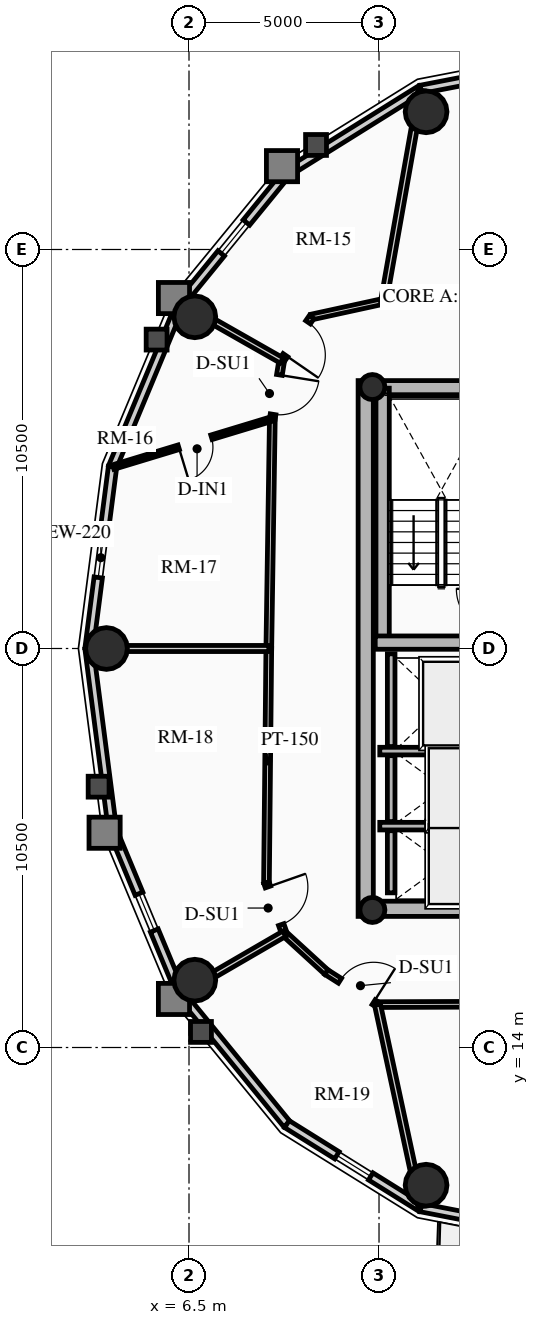
"""IFC4 building model, lengths in metres.
Left out: names, types, materials, properties, quantities, classifications, styles, units other than length and angle.
Written with IfcOpenShell. Run it as: python <this file> out.ifc"""

import sys

from ifc_helpers import new_model, si_unit, direction, frame, frame_2d, origin, origin_2d, place, context, subcontext, project, spatial, rectangle, circle, hollow_circle, extrude, source, transform, mapped, element, fill, save


model = new_model("IFC4")
c1 = context("Model", 3, precision=1e-05, world=origin(), true_north=direction((0.0, 1.0)))
c2 = subcontext(c1, "Body", "Model", "MODEL_VIEW")
j1 = project(units=[si_unit("LENGTHUNIT", "METRE"), si_unit("PLANEANGLEUNIT", "RADIAN")], contexts=[c1])
p1 = place(None, origin())
s1 = spatial("IfcSite", under=j1, at=p1, CompositionType="ELEMENT")
p2 = place(p1, origin())
s2 = spatial("IfcBuilding", under=s1, at=p2, CompositionType="ELEMENT")
p3 = place(p2, frame((0.0, 0.0, 208.3)))
s3 = spatial("IfcBuildingStorey", under=s2, at=p3, CompositionType="ELEMENT", Elevation=208.3)
p4 = place(p3, frame((11.15, 17.45, 0.0), z_axis=(0.0, 0.0, 1.0), x_axis=(0.0, 1.0, 0.0)))
e1 = element("IfcWall", 1, at=p4, inside=s3, PredefinedType="SHEAR", context=c2, shape_type="SweptSolid", body=[
    extrude(rectangle(XDim=14.1, YDim=0.4, at=frame_2d((7.05, 0.0))), origin(), (0.0, 0.0, 1.0), 2.91),
])
p5 = place(p3, frame((11.15, 17.65, 0.0), z_axis=(0.0, 0.0, 1.0), x_axis=(1.0, 0.0, 0.0)))
e2 = element("IfcWall", 2, at=p5, inside=s3, PredefinedType="SHEAR", context=c2, shape_type="SweptSolid", body=[
    extrude(rectangle(XDim=10.7, YDim=0.4, at=frame_2d((5.35, 0.0))), origin(), (0.0, 0.0, 1.0), 2.91),
])
m1 = source(origin(), c2, "Body", "SweptSolid", [
    extrude(rectangle(XDim=1.5, YDim=2.02, at=frame_2d((0.75, 1.01))), frame((0.0, 0.21, 0.0), z_axis=(0.0, -1.0, 0.0), x_axis=(1.0, 0.0, 0.0)), (0.0, 0.0, 1.0), 0.42),
])
p6 = place(p5, frame((5.45, 0.0, 0.0)))
e3 = element("IfcOpeningElement", 3, at=p6, cuts=e2, PredefinedType="OPENING", context=c2, shape_type="MappedRepresentation", body=[
    mapped(m1, transform((0.0, 0.0, 0.0), x_axis=(1.0, 0.0, 0.0), y_axis=(0.0, 1.0, 0.0), z_axis=(0.0, 0.0, 1.0), scale=1.0)),
])
p7 = place(p3, frame((11.15, 31.35, 0.0), z_axis=(0.0, 0.0, 1.0), x_axis=(1.0, 0.0, 0.0)))
e4 = element("IfcWall", 4, at=p7, inside=s3, PredefinedType="SHEAR", context=c2, shape_type="SweptSolid", body=[
    extrude(rectangle(XDim=10.7, YDim=0.4, at=frame_2d((5.35, 0.0))), origin(), (0.0, 0.0, 1.0), 2.91),
])
p8 = place(p7, frame((4.6, 0.0, 0.0)))
e5 = element("IfcOpeningElement", 5, at=p8, cuts=e4, PredefinedType="OPENING", context=c2, shape_type="MappedRepresentation", body=[
    mapped(m1, transform((0.0, 0.0, 0.0), x_axis=(1.0, 0.0, 0.0), y_axis=(0.0, 1.0, 0.0), z_axis=(0.0, 0.0, 1.0), scale=1.0)),
])
p9 = place(p3, frame((11.595, 24.655, 0.0), z_axis=(0.0, 0.0, 1.0), x_axis=(0.0, 1.0, 0.0)))
e6 = element("IfcWall", 6, at=p9, inside=s3, PredefinedType="SHEAR", context=c2, shape_type="SweptSolid", body=[
    extrude(rectangle(XDim=6.695, YDim=0.35, at=frame_2d((3.348, 0.0))), origin(), (0.0, 0.0, 1.0), 2.91),
])
p10 = place(p3, frame((11.4, 24.655, 0.0), z_axis=(0.0, 0.0, 1.0), x_axis=(1.0, 0.0, 0.0)))
e7 = element("IfcWall", 7, at=p10, inside=s3, PredefinedType="SHEAR", context=c2, shape_type="SweptSolid", body=[
    extrude(rectangle(XDim=3.285, YDim=0.35, at=frame_2d((1.643, 0.0))), origin(), (0.0, 0.0, 1.0), 2.91),
])
for number, where, z_axis, x_axis in (
    (8, (11.325, 17.62, 0.0), (0.0, 0.0, 1.0), (1.0, 0.0, 0.0)),
    (9, (11.325, 31.38, 0.0), (0.0, 0.0, 1.0), (1.0, 0.0, 0.0)),
):
    element("IfcColumn", number, at=place(p3, frame(where, z_axis=z_axis, x_axis=x_axis)), inside=s3, PredefinedType="COLUMN", context=c2, shape_type="SweptSolid", body=[
        extrude(hollow_circle(Radius=0.33, WallThickness=0.025, at=origin_2d()), origin(), (0.0, 0.0, 1.0), 2.91),
    ])
for number, where, z_axis, x_axis in (
    (10, (12.739, 38.623, 0.0), (0.0, 0.0, 1.0), (1.0, 0.0, 0.0)),
    (11, (6.653, 33.229, 0.0), (0.0, 0.0, 1.0), (1.0, 0.0, 0.0)),
    (12, (4.328, 24.5, 0.0), (0.0, 0.0, 1.0), (1.0, 0.0, 0.0)),
    (13, (6.653, 15.771, 0.0), (0.0, 0.0, 1.0), (1.0, 0.0, 0.0)),
    (14, (12.739, 10.377, 0.0), (0.0, 0.0, 1.0), (1.0, 0.0, 0.0)),
):
    element("IfcColumn", number, at=place(p3, frame(where, z_axis=z_axis, x_axis=x_axis)), inside=s3, PredefinedType="USERDEFINED", context=c2, shape_type="SweptSolid", body=[
        extrude(circle(Radius=0.55, at=origin_2d()), origin(), (0.0, 0.0, 1.0), 2.91),
    ])
p11 = place(p3, frame((12.597, 39.213, 0.0), z_axis=(0.0, 0.0, 1.0), x_axis=(0.981700307484, 0.190432419211, 0.0)))
e15 = element("IfcWall", 15, at=p11, inside=s3, PredefinedType="SOLIDWALL", context=c2, shape_type="SweptSolid", body=[
    extrude(rectangle(XDim=3.976, YDim=0.22, at=frame_2d((1.988, 0.0))), origin(), (0.0, 0.0, 1.0), 2.322),
])
m2 = source(origin(), c2, "Body", "SweptSolid", [
    extrude(rectangle(XDim=1.05, YDim=1.3, at=frame_2d((0.525, 0.65))), frame((0.0, 0.12, 0.0), z_axis=(0.0, -1.0, 0.0), x_axis=(1.0, 0.0, 0.0)), (0.0, 0.0, 1.0), 0.24),
])
p12 = place(p11, frame((1.463, 0.0, 0.65)))
e16 = element("IfcOpeningElement", 16, at=p12, cuts=e15, PredefinedType="OPENING", context=c2, shape_type="MappedRepresentation", body=[
    mapped(m2, transform((0.0, 0.0, 0.0), x_axis=(1.0, 0.0, 0.0), y_axis=(0.0, 1.0, 0.0), z_axis=(0.0, 0.0, 1.0), scale=1.0)),
])
p13 = place(p3, frame((9.076, 37.015, 0.0), z_axis=(0.0, 0.0, 1.0), x_axis=(0.848318713376, 0.529485939886, 0.0)))
e17 = element("IfcWall", 17, at=p13, inside=s3, PredefinedType="SOLIDWALL", context=c2, shape_type="SweptSolid", body=[
    extrude(rectangle(XDim=4.15, YDim=0.22, at=frame_2d((2.075, 0.0))), origin(), (0.0, 0.0, 1.0), 2.322),
])
p14 = place(p3, frame((6.282, 33.593, 0.0), z_axis=(0.0, 0.0, 1.0), x_axis=(0.632467166636, 0.774587169483, 0.0)))
e18 = element("IfcWall", 18, at=p14, inside=s3, PredefinedType="SOLIDWALL", context=c2, shape_type="SweptSolid", body=[
    extrude(rectangle(XDim=4.418, YDim=0.22, at=frame_2d((2.209, 0.0))), origin(), (0.0, 0.0, 1.0), 2.322),
])
p15 = place(p14, frame((1.684, 0.0, 0.65)))
e19 = element("IfcOpeningElement", 19, at=p15, cuts=e18, PredefinedType="OPENING", context=c2, shape_type="MappedRepresentation", body=[
    mapped(m2, transform((0.0, 0.0, 0.0), x_axis=(1.0, 0.0, 0.0), y_axis=(0.0, 1.0, 0.0), z_axis=(0.0, 0.0, 1.0), scale=1.0)),
])
p16 = place(p3, frame((4.488, 29.281, 0.0), z_axis=(0.0, 0.0, 1.0), x_axis=(0.384036305194, 0.923317993052, 0.0)))
e20 = element("IfcWall", 20, at=p16, inside=s3, PredefinedType="SOLIDWALL", context=c2, shape_type="SweptSolid", body=[
    extrude(rectangle(XDim=4.671, YDim=0.22, at=frame_2d((2.335, 0.0))), origin(), (0.0, 0.0, 1.0), 2.322),
])
p17 = place(p3, frame((3.87, 24.5, 0.0), z_axis=(0.0, 0.0, 1.0), x_axis=(0.128241318541, 0.991742993027, 0.0)))
e21 = element("IfcWall", 21, at=p17, inside=s3, PredefinedType="SOLIDWALL", context=c2, shape_type="SweptSolid", body=[
    extrude(rectangle(XDim=4.82, YDim=0.22, at=frame_2d((2.41, 0.0))), origin(), (0.0, 0.0, 1.0), 2.322),
])
p18 = place(p17, frame((1.885, 0.0, 0.65)))
e22 = element("IfcOpeningElement", 22, at=p18, cuts=e21, PredefinedType="OPENING", context=c2, shape_type="MappedRepresentation", body=[
    mapped(m2, transform((0.0, 0.0, 0.0), x_axis=(1.0, 0.0, 0.0), y_axis=(0.0, 1.0, 0.0), z_axis=(0.0, 0.0, 1.0), scale=1.0)),
])
p19 = place(p3, frame((4.488, 19.719, 0.0), z_axis=(0.0, 0.0, 1.0), x_axis=(-0.128241318541, 0.991742993027, 0.0)))
e23 = element("IfcWall", 23, at=p19, inside=s3, PredefinedType="SOLIDWALL", context=c2, shape_type="SweptSolid", body=[
    extrude(rectangle(XDim=4.82, YDim=0.22, at=frame_2d((2.41, 0.0))), origin(), (0.0, 0.0, 1.0), 2.322),
])
p20 = place(p3, frame((6.282, 15.407, 0.0), z_axis=(0.0, 0.0, 1.0), x_axis=(-0.384036305194, 0.923317993052, 0.0)))
e24 = element("IfcWall", 24, at=p20, inside=s3, PredefinedType="SOLIDWALL", context=c2, shape_type="SweptSolid", body=[
    extrude(rectangle(XDim=4.671, YDim=0.22, at=frame_2d((2.335, 0.0))), origin(), (0.0, 0.0, 1.0), 2.322),
])
p21 = place(p20, frame((1.81, 0.0, 0.65)))
e25 = element("IfcOpeningElement", 25, at=p21, cuts=e24, PredefinedType="OPENING", context=c2, shape_type="MappedRepresentation", body=[
    mapped(m2, transform((0.0, 0.0, 0.0), x_axis=(1.0, 0.0, 0.0), y_axis=(0.0, 1.0, 0.0), z_axis=(0.0, 0.0, 1.0), scale=1.0)),
])
p22 = place(p3, frame((9.076, 11.985, 0.0), z_axis=(0.0, 0.0, 1.0), x_axis=(-0.632467166636, 0.774587169483, 0.0)))
e26 = element("IfcWall", 26, at=p22, inside=s3, PredefinedType="SOLIDWALL", context=c2, shape_type="SweptSolid", body=[
    extrude(rectangle(XDim=4.418, YDim=0.22, at=frame_2d((2.209, 0.0))), origin(), (0.0, 0.0, 1.0), 2.322),
])
p23 = place(p3, frame((12.597, 9.787, 0.0), z_axis=(0.0, 0.0, 1.0), x_axis=(-0.848318713376, 0.529485939886, 0.0)))
e27 = element("IfcWall", 27, at=p23, inside=s3, PredefinedType="SOLIDWALL", context=c2, shape_type="SweptSolid", body=[
    extrude(rectangle(XDim=4.15, YDim=0.22, at=frame_2d((2.075, 0.0))), origin(), (0.0, 0.0, 1.0), 2.322),
])
p24 = place(p23, frame((1.55, 0.0, 0.65)))
e28 = element("IfcOpeningElement", 28, at=p24, cuts=e27, PredefinedType="OPENING", context=c2, shape_type="MappedRepresentation", body=[
    mapped(m2, transform((0.0, 0.0, 0.0), x_axis=(1.0, 0.0, 0.0), y_axis=(0.0, 1.0, 0.0), z_axis=(0.0, 0.0, 1.0), scale=1.0)),
])
p25 = place(p3, frame((16.5, 9.03, 0.0), z_axis=(0.0, 0.0, 1.0), x_axis=(-0.981700307484, 0.190432419211, 0.0)))
e29 = element("IfcWall", 29, at=p25, inside=s3, PredefinedType="SOLIDWALL", context=c2, shape_type="SweptSolid", body=[
    extrude(rectangle(XDim=3.976, YDim=0.22, at=frame_2d((1.988, 0.0))), origin(), (0.0, 0.0, 1.0), 2.322),
])
m3 = source(origin(), c2, "Body", "SweptSolid", [
    extrude(rectangle(XDim=1.15, YDim=2.005, at=frame_2d((0.575, 1.002))), frame((0.0, 0.12, 0.0), z_axis=(0.0, -1.0, 0.0), x_axis=(1.0, 0.0, 0.0)), (0.0, 0.0, 1.0), 0.24),
])
p26 = place(p25, frame((1.413, 0.0, 0.0)))
e30 = element("IfcOpeningElement", 30, at=p26, cuts=e29, PredefinedType="OPENING", context=c2, shape_type="MappedRepresentation", body=[
    mapped(m3, transform((0.0, 0.0, 0.0), x_axis=(1.0, 0.0, 0.0), y_axis=(0.0, 1.0, 0.0), z_axis=(0.0, 0.0, 1.0), scale=1.0)),
])
p27 = place(p3, frame((11.52, 21.8, 0.0), z_axis=(0.0, 0.0, 1.0), x_axis=(1.0, 0.0, 0.0)))
e31 = element("IfcWall", 31, at=p27, inside=s3, PredefinedType="SHEAR", context=c2, shape_type="SweptSolid", body=[
    extrude(rectangle(XDim=2.97, YDim=0.2, at=frame_2d((1.485, 0.0))), origin(), (0.0, 0.0, 1.0), 2.91),
])
p28 = place(p3, frame((11.82, 21.92, 0.0), z_axis=(0.0, 0.0, 1.0), x_axis=(0.0, 1.0, 0.0)))
e32 = element("IfcWall", 32, at=p28, inside=s3, PredefinedType="SHEAR", context=c2, shape_type="SweptSolid", body=[
    extrude(rectangle(XDim=2.44, YDim=0.2, at=frame_2d((1.22, 0.0))), origin(), (0.0, 0.0, 1.0), 2.91),
])
p29 = place(p3, frame((11.52, 19.825, 0.0), z_axis=(0.0, 0.0, 1.0), x_axis=(1.0, 0.0, 0.0)))
e33 = element("IfcWall", 33, at=p29, inside=s3, PredefinedType="SHEAR", context=c2, shape_type="SweptSolid", body=[
    extrude(rectangle(XDim=2.97, YDim=0.2, at=frame_2d((1.485, 0.0))), origin(), (0.0, 0.0, 1.0), 2.91),
])
p30 = place(p3, frame((11.82, 19.945, 0.0), z_axis=(0.0, 0.0, 1.0), x_axis=(0.0, 1.0, 0.0)))
e34 = element("IfcWall", 34, at=p30, inside=s3, PredefinedType="SHEAR", context=c2, shape_type="SweptSolid", body=[
    extrude(rectangle(XDim=1.735, YDim=0.2, at=frame_2d((0.867, 0.0))), origin(), (0.0, 0.0, 1.0), 2.91),
])
p31 = place(p3, frame((11.82, 18.07, 0.0), z_axis=(0.0, 0.0, 1.0), x_axis=(0.0, 1.0, 0.0)))
e35 = element("IfcWall", 35, at=p31, inside=s3, PredefinedType="SHEAR", context=c2, shape_type="SweptSolid", body=[
    extrude(rectangle(XDim=1.635, YDim=0.2, at=frame_2d((0.817, 0.0))), origin(), (0.0, 0.0, 1.0), 2.91),
])
p32 = place(p3, frame((18.143, 33.86, 0.0), z_axis=(0.0, 0.0, 1.0), x_axis=(-0.999419208319, -0.034077060363, 0.0)))
e36 = element("IfcWall", 36, at=p32, inside=s3, PredefinedType="PARTITIONING", context=c2, shape_type="SweptSolid", body=[
    extrude(rectangle(XDim=6.527, YDim=0.15, at=frame_2d((3.263, 0.0))), origin(), (0.0, 0.0, 1.0), 2.255),
])
p33 = place(p3, frame((11.62, 33.637, 0.0), z_axis=(0.0, 0.0, 1.0), x_axis=(-0.97702579435, -0.213121085711, 0.0)))
e37 = element("IfcWall", 37, at=p33, inside=s3, PredefinedType="PARTITIONING", context=c2, shape_type="SweptSolid", body=[
    extrude(rectangle(XDim=1.935, YDim=0.15, at=frame_2d((0.967, 0.0))), origin(), (0.0, 0.0, 1.0), 2.255),
])
p34 = place(p3, frame((9.729, 33.225, 0.0), z_axis=(0.0, 0.0, 1.0), x_axis=(-0.567183649484, -0.82359134755, 0.0)))
e38 = element("IfcWall", 38, at=p34, inside=s3, PredefinedType="PARTITIONING", context=c2, shape_type="SweptSolid", body=[
    extrude(rectangle(XDim=1.392, YDim=0.15, at=frame_2d((0.696, 0.0))), origin(), (0.0, 0.0, 1.0), 2.322),
])
m4 = source(origin(), c2, "Body", "SweptSolid", [
    extrude(rectangle(XDim=1.05, YDim=2.015, at=frame_2d((0.525, 1.007))), frame((0.0, 0.085, 0.0), z_axis=(0.0, -1.0, 0.0), x_axis=(1.0, 0.0, 0.0)), (0.0, 0.0, 1.0), 0.17),
])
p35 = place(p34, frame((0.171, 0.0, 0.0)))
e39 = element("IfcOpeningElement", 39, at=p35, cuts=e38, PredefinedType="OPENING", context=c2, shape_type="MappedRepresentation", body=[
    mapped(m4, transform((0.0, 0.0, 0.0), x_axis=(1.0, 0.0, 0.0), y_axis=(0.0, 1.0, 0.0), z_axis=(0.0, 0.0, 1.0), scale=1.0)),
])
p36 = place(p3, frame((8.94, 32.078, 0.0), z_axis=(0.0, 0.0, 1.0), x_axis=(-0.159148467753, -0.98725466077, 0.0)))
e40 = element("IfcWall", 40, at=p36, inside=s3, PredefinedType="PARTITIONING", context=c2, shape_type="SweptSolid", body=[
    extrude(rectangle(XDim=1.554, YDim=0.15, at=frame_2d((0.777, 0.0))), origin(), (0.0, 0.0, 1.0), 2.255),
])
p37 = place(p36, frame((0.384, 0.0, 0.0)))
e41 = element("IfcOpeningElement", 41, at=p37, cuts=e40, PredefinedType="OPENING", context=c2, shape_type="MappedRepresentation", body=[
    mapped(m4, transform((0.0, 0.0, 0.0), x_axis=(1.0, 0.0, 0.0), y_axis=(0.0, 1.0, 0.0), z_axis=(0.0, 0.0, 1.0), scale=1.0)),
])
p38 = place(p3, frame((8.693, 30.544, 0.0), z_axis=(0.0, 0.0, 1.0), x_axis=(-0.015307007986, -0.99988284089, 0.0)))
e42 = element("IfcWall", 42, at=p38, inside=s3, PredefinedType="PARTITIONING", context=c2, shape_type="SweptSolid", body=[
    extrude(rectangle(XDim=6.045, YDim=0.15, at=frame_2d((3.022, 0.0))), origin(), (0.0, 0.0, 1.0), 2.255),
])
p39 = place(p3, frame((8.6, 24.5, 0.0), z_axis=(0.0, 0.0, 1.0), x_axis=(-0.010023665349, -0.999949761805, 0.0)))
e43 = element("IfcWall", 43, at=p39, inside=s3, PredefinedType="PARTITIONING", context=c2, shape_type="SweptSolid", body=[
    extrude(rectangle(XDim=6.162, YDim=0.15, at=frame_2d((3.081, 0.0))), origin(), (0.0, 0.0, 1.0), 2.255),
])
p40 = place(p3, frame((8.538, 18.338, 0.0), z_axis=(0.0, 0.0, 1.0), x_axis=(0.331358150167, -0.94350504838, 0.0)))
e44 = element("IfcWall", 44, at=p40, inside=s3, PredefinedType="PARTITIONING", context=c2, shape_type="SweptSolid", body=[
    extrude(rectangle(XDim=1.424, YDim=0.15, at=frame_2d((0.712, 0.0))), origin(), (0.0, 0.0, 1.0), 2.255),
])
p41 = place(p40, frame((0.12, 0.0, 0.0)))
e45 = element("IfcOpeningElement", 45, at=p41, cuts=e44, PredefinedType="OPENING", context=c2, shape_type="MappedRepresentation", body=[
    mapped(m4, transform((0.0, 0.0, 0.0), x_axis=(1.0, 0.0, 0.0), y_axis=(0.0, 1.0, 0.0), z_axis=(0.0, 0.0, 1.0), scale=1.0)),
])
p42 = place(p3, frame((9.01, 16.994, 0.0), z_axis=(0.0, 0.0, 1.0), x_axis=(0.737701798986, -0.67512669609, 0.0)))
e46 = element("IfcWall", 46, at=p42, inside=s3, PredefinedType="PARTITIONING", context=c2, shape_type="SweptSolid", body=[
    extrude(rectangle(XDim=1.498, YDim=0.15, at=frame_2d((0.749, 0.0))), origin(), (0.0, 0.0, 1.0), 2.322),
])
p43 = place(p3, frame((10.115, 15.983, 0.0), z_axis=(0.0, 0.0, 1.0), x_axis=(0.843995849351, -0.536349705209, 0.0)))
e47 = element("IfcWall", 47, at=p43, inside=s3, PredefinedType="PARTITIONING", context=c2, shape_type="SweptSolid", body=[
    extrude(rectangle(XDim=1.593, YDim=0.15, at=frame_2d((0.796, 0.0))), origin(), (0.0, 0.0, 1.0), 2.255),
])
p44 = place(p43, frame((0.423, 0.0, 0.0)))
e48 = element("IfcOpeningElement", 48, at=p44, cuts=e47, PredefinedType="OPENING", context=c2, shape_type="MappedRepresentation", body=[
    mapped(m4, transform((0.0, 0.0, 0.0), x_axis=(1.0, 0.0, 0.0), y_axis=(0.0, 1.0, 0.0), z_axis=(0.0, 0.0, 1.0), scale=1.0)),
])
p45 = place(p3, frame((11.46, 15.129, 0.0), z_axis=(0.0, 0.0, 1.0), x_axis=(0.999993513287, 0.003601858435, 0.0)))
e49 = element("IfcWall", 49, at=p45, inside=s3, PredefinedType="PARTITIONING", context=c2, shape_type="SweptSolid", body=[
    extrude(rectangle(XDim=3.321, YDim=0.15, at=frame_2d((1.661, 0.0))), origin(), (0.0, 0.0, 1.0), 2.322),
])
p46 = place(p3, frame((11.62, 33.637, 0.0), z_axis=(0.0, 0.0, 1.0), x_axis=(0.174269061361, 0.984698072636, 0.0)))
e50 = element("IfcWall", 50, at=p46, inside=s3, PredefinedType="PARTITIONING", context=c2, shape_type="SweptSolid", body=[
    extrude(rectangle(XDim=5.643, YDim=0.16, at=frame_2d((2.822, 0.0))), origin(), (0.0, 0.0, 1.0), 2.322),
])
p47 = place(p3, frame((8.94, 32.078, 0.0), z_axis=(0.0, 0.0, 1.0), x_axis=(-0.869170975588, 0.494511693689, 0.0)))
e51 = element("IfcWall", 51, at=p47, inside=s3, PredefinedType="PARTITIONING", context=c2, shape_type="SweptSolid", body=[
    extrude(rectangle(XDim=3.039, YDim=0.16, at=frame_2d((1.52, 0.0))), origin(), (0.0, 0.0, 1.0), 2.322),
])
p48 = place(p3, frame((8.6, 24.5, 0.0), z_axis=(0.0, 0.0, 1.0), x_axis=(-1.0, 0.0, 0.0)))
e52 = element("IfcWall", 52, at=p48, inside=s3, PredefinedType="PARTITIONING", context=c2, shape_type="SweptSolid", body=[
    extrude(rectangle(XDim=4.71, YDim=0.16, at=frame_2d((2.355, 0.0))), origin(), (0.0, 0.0, 1.0), 2.322),
])
p49 = place(p3, frame((9.01, 16.994, 0.0), z_axis=(0.0, 0.0, 1.0), x_axis=(-0.864647164532, -0.502379618283, 0.0)))
e53 = element("IfcWall", 53, at=p49, inside=s3, PredefinedType="PARTITIONING", context=c2, shape_type="SweptSolid", body=[
    extrude(rectangle(XDim=3.136, YDim=0.16, at=frame_2d((1.568, 0.0))), origin(), (0.0, 0.0, 1.0), 2.322),
])
p50 = place(p3, frame((11.46, 15.129, 0.0), z_axis=(0.0, 0.0, 1.0), x_axis=(0.210058897642, -0.977688733453, 0.0)))
e54 = element("IfcWall", 54, at=p50, inside=s3, PredefinedType="PARTITIONING", context=c2, shape_type="SweptSolid", body=[
    extrude(rectangle(XDim=5.444, YDim=0.16, at=frame_2d((2.722, 0.0))), origin(), (0.0, 0.0, 1.0), 2.322),
])
p51 = place(p3, frame((8.693, 30.544, 0.0), z_axis=(0.0, 0.0, 1.0), x_axis=(-0.956933754187, -0.290306372814, 0.0)))
e55 = element("IfcWall", 55, at=p51, inside=s3, PredefinedType="PARTITIONING", context=c2, shape_type="SweptSolid", body=[
    extrude(rectangle(XDim=4.374, YDim=0.125, at=frame_2d((2.187, 0.0))), origin(), (0.0, 0.0, 1.0), 2.255),
])
m5 = source(origin(), c2, "Body", "SweptSolid", [
    extrude(rectangle(XDim=0.9, YDim=2.005, at=frame_2d((0.45, 1.002))), frame((0.0, 0.073, 0.0), z_axis=(0.0, -1.0, 0.0), x_axis=(1.0, 0.0, 0.0)), (0.0, 0.0, 1.0), 0.145),
])
p52 = place(p51, frame((1.674, 0.0, 0.0)))
e56 = element("IfcOpeningElement", 56, at=p52, cuts=e55, PredefinedType="OPENING", context=c2, shape_type="MappedRepresentation", body=[
    mapped(m5, transform((0.0, 0.0, 0.0), x_axis=(1.0, 0.0, 0.0), y_axis=(0.0, 1.0, 0.0), z_axis=(0.0, 0.0, 1.0), scale=1.0)),
])
m6 = source(origin(), c2, "Body", "SweptSolid", [
    extrude(rectangle(XDim=1.05, YDim=1.3, at=frame_2d((0.525, 0.65))), frame((0.0, 0.03, 0.0), z_axis=(0.0, -1.0, 0.0), x_axis=(1.0, 0.0, 0.0)), (0.0, 0.0, 1.0), 0.06),
])
p53 = place(p15, origin())
e57 = element("IfcWindow", 57, at=p53, inside=s3, PartitioningType="SINGLE_PANEL", PredefinedType="WINDOW", context=c2, shape_type="MappedRepresentation", body=[
    mapped(m6, transform((0.0, 0.0, 0.0), x_axis=(1.0, 0.0, 0.0), y_axis=(0.0, 1.0, 0.0), z_axis=(0.0, 0.0, 1.0), scale=1.0)),
])
fill(e19, e57)
p54 = place(p18, origin())
e58 = element("IfcWindow", 58, at=p54, inside=s3, PartitioningType="SINGLE_PANEL", PredefinedType="WINDOW", context=c2, shape_type="MappedRepresentation", body=[
    mapped(m6, transform((0.0, 0.0, 0.0), x_axis=(1.0, 0.0, 0.0), y_axis=(0.0, 1.0, 0.0), z_axis=(0.0, 0.0, 1.0), scale=1.0)),
])
fill(e22, e58)
p55 = place(p21, origin())
e59 = element("IfcWindow", 59, at=p55, inside=s3, PartitioningType="SINGLE_PANEL", PredefinedType="WINDOW", context=c2, shape_type="MappedRepresentation", body=[
    mapped(m6, transform((0.0, 0.0, 0.0), x_axis=(1.0, 0.0, 0.0), y_axis=(0.0, 1.0, 0.0), z_axis=(0.0, 0.0, 1.0), scale=1.0)),
])
fill(e25, e59)
p56 = place(p24, origin())
e60 = element("IfcWindow", 60, at=p56, inside=s3, PartitioningType="SINGLE_PANEL", PredefinedType="WINDOW", context=c2, shape_type="MappedRepresentation", body=[
    mapped(m6, transform((0.0, 0.0, 0.0), x_axis=(1.0, 0.0, 0.0), y_axis=(0.0, 1.0, 0.0), z_axis=(0.0, 0.0, 1.0), scale=1.0)),
])
fill(e28, e60)
m7 = source(origin(), c2, "Body", "SweptSolid", [
    extrude(rectangle(XDim=1.05, YDim=2.015, at=frame_2d((0.525, 1.007))), frame((0.0, 0.025, 0.0), z_axis=(0.0, -1.0, 0.0), x_axis=(1.0, 0.0, 0.0)), (0.0, 0.0, 1.0), 0.05),
])
p57 = place(p35, origin())
e61 = element("IfcDoor", 61, at=p57, inside=s3, OperationType="SINGLE_SWING_RIGHT", PredefinedType="DOOR", context=c2, shape_type="MappedRepresentation", body=[
    mapped(m7, transform((0.0, 0.0, 0.0), x_axis=(1.0, 0.0, 0.0), y_axis=(0.0, 1.0, 0.0), z_axis=(0.0, 0.0, 1.0), scale=1.0)),
])
fill(e39, e61)
p58 = place(p37, origin())
e62 = element("IfcDoor", 62, at=p58, inside=s3, OperationType="SINGLE_SWING_LEFT", PredefinedType="DOOR", context=c2, shape_type="MappedRepresentation", body=[
    mapped(m7, transform((0.0, 0.0, 0.0), x_axis=(1.0, 0.0, 0.0), y_axis=(0.0, 1.0, 0.0), z_axis=(0.0, 0.0, 1.0), scale=1.0)),
])
fill(e41, e62)
m8 = source(origin(), c2, "Body", "SweptSolid", [
    extrude(rectangle(XDim=0.9, YDim=2.005, at=frame_2d((0.45, 1.002))), frame((0.0, 0.025, 0.0), z_axis=(0.0, -1.0, 0.0), x_axis=(1.0, 0.0, 0.0)), (0.0, 0.0, 1.0), 0.05),
])
p59 = place(p52, origin())
e63 = element("IfcDoor", 63, at=p59, inside=s3, OperationType="SINGLE_SWING_RIGHT", PredefinedType="DOOR", context=c2, shape_type="MappedRepresentation", body=[
    mapped(m8, transform((0.0, 0.0, 0.0), x_axis=(1.0, 0.0, 0.0), y_axis=(0.0, 1.0, 0.0), z_axis=(0.0, 0.0, 1.0), scale=1.0)),
])
fill(e56, e63)
p60 = place(p41, origin())
e64 = element("IfcDoor", 64, at=p60, inside=s3, OperationType="SINGLE_SWING_LEFT", PredefinedType="DOOR", context=c2, shape_type="MappedRepresentation", body=[
    mapped(m7, transform((0.0, 0.0, 0.0), x_axis=(1.0, 0.0, 0.0), y_axis=(0.0, 1.0, 0.0), z_axis=(0.0, 0.0, 1.0), scale=1.0)),
])
fill(e45, e64)
p61 = place(p44, origin())
e65 = element("IfcDoor", 65, at=p61, inside=s3, OperationType="SINGLE_SWING_RIGHT", PredefinedType="DOOR", context=c2, shape_type="MappedRepresentation", body=[
    mapped(m7, transform((0.0, 0.0, 0.0), x_axis=(1.0, 0.0, 0.0), y_axis=(0.0, 1.0, 0.0), z_axis=(0.0, 0.0, 1.0), scale=1.0)),
])
fill(e48, e65)
save(model, sys.argv[1])
